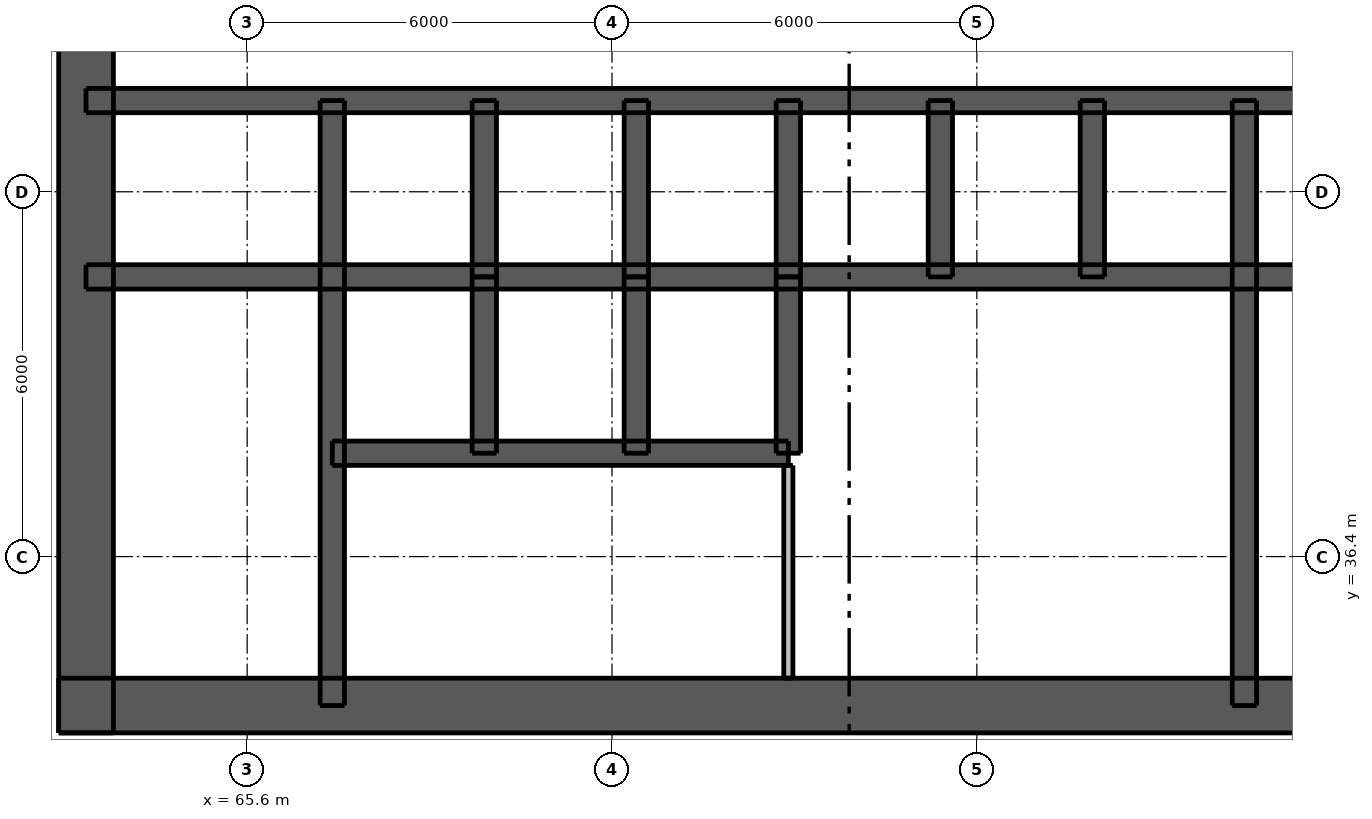
"""IFC4 building model, lengths in metres.
Left out: names, types, materials, properties, quantities, classifications, styles, units other than length and angle.
Written with IfcOpenShell. Run it as: python <this file> out.ifc"""

import sys

from ifc_helpers import new_model, si_unit, direction, frame, frame_2d, origin, place, context, subcontext, project, spatial, rectangle, extrude, element, fill, save


model = new_model("IFC4")
c1 = context("Model", 3, precision=1e-05, world=origin(), true_north=direction((0.0, 1.0)))
c2 = subcontext(c1, "Body", "Model", "MODEL_VIEW")
j1 = project(units=[si_unit("LENGTHUNIT", "METRE"), si_unit("PLANEANGLEUNIT", "RADIAN")], contexts=[c1])
p1 = place(None, origin())
s1 = spatial("IfcSite", under=j1, at=p1, CompositionType="ELEMENT")
p2 = place(p1, origin())
s2 = spatial("IfcBuilding", under=s1, at=p2, CompositionType="ELEMENT")
p3 = place(p2, frame((0.0, 0.0, 30.1)))
s3 = spatial("IfcBuildingStorey", under=s2, at=p3, CompositionType="ELEMENT", Elevation=30.1)
p4 = place(p3, frame((62.5, 33.95, 0.0), z_axis=(0.0, 0.0, 1.0), x_axis=(1.0, 0.0, 0.0)))
e1 = element("IfcWall", 1, at=p4, inside=s3, PredefinedType="SHEAR", context=c2, shape_type="SweptSolid", body=[
    extrude(rectangle(XDim=24.0, YDim=0.9, at=frame_2d((12.0, 0.0))), origin(), (0.0, 0.0, 1.0), 3.05),
])
p5 = place(p4, frame((2.05, 0.0, 0.0)))
e2 = element("IfcOpeningElement", 2, at=p5, cuts=e1, PredefinedType="OPENING", context=c2, shape_type="SweptSolid", body=[
    extrude(rectangle(XDim=1.1, YDim=2.1, at=frame_2d((0.55, 1.05))), frame((0.0, 0.46, 0.0), z_axis=(0.0, -1.0, 0.0), x_axis=(1.0, 0.0, 0.0)), (0.0, 0.0, 1.0), 0.92),
])
p6 = place(p4, frame((20.85, 0.0, 0.0)))
e3 = element("IfcOpeningElement", 3, at=p6, cuts=e1, PredefinedType="OPENING", context=c2, shape_type="SweptSolid", body=[
    extrude(rectangle(XDim=1.1, YDim=2.1, at=frame_2d((0.55, 1.05))), frame((0.0, 0.46, 0.0), z_axis=(0.0, -1.0, 0.0), x_axis=(1.0, 0.0, 0.0)), (0.0, 0.0, 1.0), 0.92),
])
p7 = place(p4, frame((8.0, 0.0, 0.0)))
e4 = element("IfcOpeningElement", 4, at=p7, cuts=e1, PredefinedType="OPENING", context=c2, shape_type="SweptSolid", body=[
    extrude(rectangle(XDim=1.1, YDim=2.1, at=frame_2d((0.55, 1.05))), frame((0.0, 0.46, 0.0), z_axis=(0.0, -1.0, 0.0), x_axis=(1.0, 0.0, 0.0)), (0.0, 0.0, 1.0), 0.92),
])
p8 = place(p4, frame((15.3, 0.0, 0.0)))
e5 = element("IfcOpeningElement", 5, at=p8, cuts=e1, PredefinedType="OPENING", context=c2, shape_type="SweptSolid", body=[
    extrude(rectangle(XDim=0.9, YDim=2.1, at=frame_2d((0.45, 1.05))), frame((0.0, 0.46, 0.0), z_axis=(0.0, -1.0, 0.0), x_axis=(1.0, 0.0, 0.0)), (0.0, 0.0, 1.0), 0.92),
])
p9 = place(p3, frame((62.95, 33.5, 0.0), z_axis=(0.0, 0.0, 1.0), x_axis=(0.0, 1.0, 0.0)))
e6 = element("IfcWall", 6, at=p9, inside=s3, PredefinedType="SHEAR", context=c2, shape_type="SweptSolid", body=[
    extrude(rectangle(XDim=24.0, YDim=0.9, at=frame_2d((12.0, 0.0))), origin(), (0.0, 0.0, 1.0), 3.05),
])
p10 = place(p9, frame((11.2, 0.0, 0.0)))
e7 = element("IfcOpeningElement", 7, at=p10, cuts=e6, PredefinedType="OPENING", context=c2, shape_type="SweptSolid", body=[
    extrude(rectangle(XDim=1.6, YDim=2.1, at=frame_2d((0.8, 1.05))), frame((0.0, 0.46, 0.0), z_axis=(0.0, -1.0, 0.0), x_axis=(1.0, 0.0, 0.0)), (0.0, 0.0, 1.0), 0.92),
])
p11 = place(p3, frame((62.95, 41.0, 0.0), z_axis=(0.0, 0.0, 1.0), x_axis=(1.0, 0.0, 0.0)))
e8 = element("IfcWall", 8, at=p11, inside=s3, PredefinedType="SHEAR", context=c2, shape_type="SweptSolid", body=[
    extrude(rectangle(XDim=23.1, YDim=0.4, at=frame_2d((11.55, 0.0))), origin(), (0.0, 0.0, 1.0), 3.05),
])
p12 = place(p3, frame((62.95, 43.9, 0.0), z_axis=(0.0, 0.0, 1.0), x_axis=(1.0, 0.0, 0.0)))
e9 = element("IfcWall", 9, at=p12, inside=s3, PredefinedType="SHEAR", context=c2, shape_type="SweptSolid", body=[
    extrude(rectangle(XDim=23.1, YDim=0.4, at=frame_2d((11.55, 0.0))), origin(), (0.0, 0.0, 1.0), 3.05),
])
p13 = place(p12, frame((1.7, 0.0, 0.0)))
e10 = element("IfcOpeningElement", 10, at=p13, cuts=e9, PredefinedType="OPENING", context=c2, shape_type="SweptSolid", body=[
    extrude(rectangle(XDim=0.9, YDim=2.1, at=frame_2d((0.45, 1.05))), frame((0.0, 0.21, 0.0), z_axis=(0.0, -1.0, 0.0), x_axis=(1.0, 0.0, 0.0)), (0.0, 0.0, 1.0), 0.42),
])
p14 = place(p12, frame((20.5, 0.0, 0.0)))
e11 = element("IfcOpeningElement", 11, at=p14, cuts=e9, PredefinedType="OPENING", context=c2, shape_type="SweptSolid", body=[
    extrude(rectangle(XDim=0.9, YDim=2.1, at=frame_2d((0.45, 1.05))), frame((0.0, 0.21, 0.0), z_axis=(0.0, -1.0, 0.0), x_axis=(1.0, 0.0, 0.0)), (0.0, 0.0, 1.0), 0.42),
])
p15 = place(p12, frame((4.75, 0.0, 0.0)))
e12 = element("IfcOpeningElement", 12, at=p15, cuts=e9, PredefinedType="OPENING", context=c2, shape_type="SweptSolid", body=[
    extrude(rectangle(XDim=1.1, YDim=2.1, at=frame_2d((0.55, 1.05))), frame((0.0, 0.21, 0.0), z_axis=(0.0, -1.0, 0.0), x_axis=(1.0, 0.0, 0.0)), (0.0, 0.0, 1.0), 0.42),
])
p16 = place(p12, frame((7.25, 0.0, 0.0)))
e13 = element("IfcOpeningElement", 13, at=p16, cuts=e9, PredefinedType="OPENING", context=c2, shape_type="SweptSolid", body=[
    extrude(rectangle(XDim=1.1, YDim=2.1, at=frame_2d((0.55, 1.05))), frame((0.0, 0.21, 0.0), z_axis=(0.0, -1.0, 0.0), x_axis=(1.0, 0.0, 0.0)), (0.0, 0.0, 1.0), 0.42),
])
p17 = place(p12, frame((9.75, 0.0, 0.0)))
e14 = element("IfcOpeningElement", 14, at=p17, cuts=e9, PredefinedType="OPENING", context=c2, shape_type="SweptSolid", body=[
    extrude(rectangle(XDim=1.1, YDim=2.1, at=frame_2d((0.55, 1.05))), frame((0.0, 0.21, 0.0), z_axis=(0.0, -1.0, 0.0), x_axis=(1.0, 0.0, 0.0)), (0.0, 0.0, 1.0), 0.42),
])
p18 = place(p12, frame((12.25, 0.0, 0.0)))
e15 = element("IfcOpeningElement", 15, at=p18, cuts=e9, PredefinedType="OPENING", context=c2, shape_type="SweptSolid", body=[
    extrude(rectangle(XDim=1.1, YDim=2.1, at=frame_2d((0.55, 1.05))), frame((0.0, 0.21, 0.0), z_axis=(0.0, -1.0, 0.0), x_axis=(1.0, 0.0, 0.0)), (0.0, 0.0, 1.0), 0.42),
])
p19 = place(p12, frame((14.75, 0.0, 0.0)))
e16 = element("IfcOpeningElement", 16, at=p19, cuts=e9, PredefinedType="OPENING", context=c2, shape_type="SweptSolid", body=[
    extrude(rectangle(XDim=1.1, YDim=2.1, at=frame_2d((0.55, 1.05))), frame((0.0, 0.21, 0.0), z_axis=(0.0, -1.0, 0.0), x_axis=(1.0, 0.0, 0.0)), (0.0, 0.0, 1.0), 0.42),
])
p20 = place(p12, frame((17.25, 0.0, 0.0)))
e17 = element("IfcOpeningElement", 17, at=p20, cuts=e9, PredefinedType="OPENING", context=c2, shape_type="SweptSolid", body=[
    extrude(rectangle(XDim=1.1, YDim=2.1, at=frame_2d((0.55, 1.05))), frame((0.0, 0.21, 0.0), z_axis=(0.0, -1.0, 0.0), x_axis=(1.0, 0.0, 0.0)), (0.0, 0.0, 1.0), 0.42),
])
p21 = place(p3, frame((67.0, 33.95, 0.0), z_axis=(0.0, 0.0, 1.0), x_axis=(0.0, 1.0, 0.0)))
e18 = element("IfcWall", 18, at=p21, inside=s3, PredefinedType="SHEAR", context=c2, shape_type="SweptSolid", body=[
    extrude(rectangle(XDim=9.95, YDim=0.4, at=frame_2d((4.975, 0.0))), origin(), (0.0, 0.0, 1.0), 3.05),
])
p22 = place(p21, frame((0.65, 0.0, 0.0)))
e19 = element("IfcOpeningElement", 19, at=p22, cuts=e18, PredefinedType="OPENING", context=c2, shape_type="SweptSolid", body=[
    extrude(rectangle(XDim=1.1, YDim=2.1, at=frame_2d((0.55, 1.05))), frame((0.0, 0.21, 0.0), z_axis=(0.0, -1.0, 0.0), x_axis=(1.0, 0.0, 0.0)), (0.0, 0.0, 1.0), 0.42),
])
p23 = place(p3, frame((82.0, 33.95, 0.0), z_axis=(0.0, 0.0, 1.0), x_axis=(0.0, 1.0, 0.0)))
e20 = element("IfcWall", 20, at=p23, inside=s3, PredefinedType="SHEAR", context=c2, shape_type="SweptSolid", body=[
    extrude(rectangle(XDim=9.95, YDim=0.4, at=frame_2d((4.975, 0.0))), origin(), (0.0, 0.0, 1.0), 3.05),
])
for number, where, z_axis, x_axis in (
    (21, (69.5, 41.0, 0.0), (0.0, 0.0, 1.0), (0.0, 1.0, 0.0)),
    (22, (72.0, 41.0, 0.0), (0.0, 0.0, 1.0), (0.0, 1.0, 0.0)),
    (23, (74.5, 41.0, 0.0), (0.0, 0.0, 1.0), (0.0, 1.0, 0.0)),
    (24, (77.0, 41.0, 0.0), (0.0, 0.0, 1.0), (0.0, 1.0, 0.0)),
    (25, (79.5, 41.0, 0.0), (0.0, 0.0, 1.0), (0.0, 1.0, 0.0)),
):
    element("IfcWall", number, at=place(p3, frame(where, z_axis=z_axis, x_axis=x_axis)), inside=s3, PredefinedType="SHEAR", context=c2, shape_type="SweptSolid", body=[
        extrude(rectangle(XDim=2.9, YDim=0.4, at=frame_2d((1.45, 0.0))), origin(), (0.0, 0.0, 1.0), 3.05),
    ])
p24 = place(p3, frame((67.0, 38.1, 0.0), z_axis=(0.0, 0.0, 1.0), x_axis=(1.0, 0.0, 0.0)))
e26 = element("IfcWall", 26, at=p24, inside=s3, PredefinedType="SHEAR", context=c2, shape_type="SweptSolid", body=[
    extrude(rectangle(XDim=7.5, YDim=0.4, at=frame_2d((3.75, 0.0))), origin(), (0.0, 0.0, 1.0), 3.05),
])
p25 = place(p24, frame((0.7, 0.0, 0.0)))
e27 = element("IfcOpeningElement", 27, at=p25, cuts=e26, PredefinedType="OPENING", context=c2, shape_type="SweptSolid", body=[
    extrude(rectangle(XDim=1.1, YDim=2.1, at=frame_2d((0.55, 1.05))), frame((0.0, 0.21, 0.0), z_axis=(0.0, -1.0, 0.0), x_axis=(1.0, 0.0, 0.0)), (0.0, 0.0, 1.0), 0.42),
])
p26 = place(p24, frame((3.2, 0.0, 0.0)))
e28 = element("IfcOpeningElement", 28, at=p26, cuts=e26, PredefinedType="OPENING", context=c2, shape_type="SweptSolid", body=[
    extrude(rectangle(XDim=1.1, YDim=2.1, at=frame_2d((0.55, 1.05))), frame((0.0, 0.21, 0.0), z_axis=(0.0, -1.0, 0.0), x_axis=(1.0, 0.0, 0.0)), (0.0, 0.0, 1.0), 0.42),
])
p27 = place(p24, frame((5.65, 0.0, 0.0)))
e29 = element("IfcOpeningElement", 29, at=p27, cuts=e26, PredefinedType="OPENING", context=c2, shape_type="SweptSolid", body=[
    extrude(rectangle(XDim=1.2, YDim=2.1, at=frame_2d((0.6, 1.05))), frame((0.0, 0.21, 0.0), z_axis=(0.0, -1.0, 0.0), x_axis=(1.0, 0.0, 0.0)), (0.0, 0.0, 1.0), 0.42),
])
for number, where, z_axis, x_axis in (
    (30, (69.5, 38.1, 0.0), (0.0, 0.0, 1.0), (0.0, 1.0, 0.0)),
    (31, (72.0, 38.1, 0.0), (0.0, 0.0, 1.0), (0.0, 1.0, 0.0)),
    (32, (74.5, 38.1, 0.0), (0.0, 0.0, 1.0), (0.0, 1.0, 0.0)),
):
    element("IfcWall", number, at=place(p3, frame(where, z_axis=z_axis, x_axis=x_axis)), inside=s3, PredefinedType="SHEAR", context=c2, shape_type="SweptSolid", body=[
        extrude(rectangle(XDim=2.9, YDim=0.4, at=frame_2d((1.45, 0.0))), origin(), (0.0, 0.0, 1.0), 3.05),
    ])
p28 = place(p3, frame((74.5, 34.4, 0.0), z_axis=(0.0, 0.0, 1.0), x_axis=(0.0, 1.0, 0.0)))
e33 = element("IfcWall", 33, at=p28, inside=s3, PredefinedType="PLUMBINGWALL", context=c2, shape_type="SweptSolid", body=[
    extrude(rectangle(XDim=3.5, YDim=0.15, at=frame_2d((1.75, 0.0))), origin(), (0.0, 0.0, 1.0), 3.05),
])
p29 = place(p5, origin())
e34 = element("IfcDoor", 34, at=p29, inside=s3, OperationType="SINGLE_SWING_LEFT", PredefinedType="DOOR", context=c2, shape_type="SweptSolid", body=[
    extrude(rectangle(XDim=1.1, YDim=2.1, at=frame_2d((0.55, 1.05))), frame((0.0, 0.438, 0.0), z_axis=(0.0, -1.0, 0.0), x_axis=(1.0, 0.0, 0.0)), (0.0, 0.0, 1.0), 0.05),
])
fill(e2, e34)
p30 = place(p7, origin())
e35 = element("IfcDoor", 35, at=p30, inside=s3, OperationType="SINGLE_SWING_LEFT", PredefinedType="DOOR", context=c2, shape_type="SweptSolid", body=[
    extrude(rectangle(XDim=1.1, YDim=2.1, at=frame_2d((0.55, 1.05))), frame((0.0, 0.438, 0.0), z_axis=(0.0, -1.0, 0.0), x_axis=(1.0, 0.0, 0.0)), (0.0, 0.0, 1.0), 0.05),
])
fill(e4, e35)
p31 = place(p22, origin())
e36 = element("IfcDoor", 36, at=p31, inside=s3, OperationType="SINGLE_SWING_RIGHT", PredefinedType="DOOR", context=c2, shape_type="SweptSolid", body=[
    extrude(rectangle(XDim=1.1, YDim=2.1, at=frame_2d((0.55, 1.05))), frame((0.0, -0.138, 0.0), z_axis=(0.0, -1.0, 0.0), x_axis=(1.0, 0.0, 0.0)), (0.0, 0.0, 1.0), 0.05),
])
fill(e19, e36)
p32 = place(p8, origin())
e37 = element("IfcDoor", 37, at=p32, inside=s3, OperationType="SINGLE_SWING_LEFT", PredefinedType="DOOR", context=c2, shape_type="SweptSolid", body=[
    extrude(rectangle(XDim=0.9, YDim=2.1, at=frame_2d((0.45, 1.05))), frame((0.0, 0.438, 0.0), z_axis=(0.0, -1.0, 0.0), x_axis=(1.0, 0.0, 0.0)), (0.0, 0.0, 1.0), 0.05),
])
fill(e5, e37)
p33 = place(p13, origin())
e38 = element("IfcDoor", 38, at=p33, inside=s3, OperationType="SINGLE_SWING_LEFT", PredefinedType="DOOR", context=c2, shape_type="SweptSolid", body=[
    extrude(rectangle(XDim=0.9, YDim=2.1, at=frame_2d((0.45, 1.05))), frame((0.0, -0.138, 0.0), z_axis=(0.0, -1.0, 0.0), x_axis=(1.0, 0.0, 0.0)), (0.0, 0.0, 1.0), 0.05),
])
fill(e10, e38)
p34 = place(p15, origin())
e39 = element("IfcDoor", 39, at=p34, inside=s3, OperationType="DOUBLE_DOOR_SLIDING", PredefinedType="DOOR", context=c2, shape_type="SweptSolid", body=[
    extrude(rectangle(XDim=1.1, YDim=2.1, at=frame_2d((0.55, 1.05))), frame((0.0, 0.025, 0.0), z_axis=(0.0, -1.0, 0.0), x_axis=(1.0, 0.0, 0.0)), (0.0, 0.0, 1.0), 0.05),
])
fill(e12, e39)
p35 = place(p16, origin())
e40 = element("IfcDoor", 40, at=p35, inside=s3, OperationType="DOUBLE_DOOR_SLIDING", PredefinedType="DOOR", context=c2, shape_type="SweptSolid", body=[
    extrude(rectangle(XDim=1.1, YDim=2.1, at=frame_2d((0.55, 1.05))), frame((0.0, 0.025, 0.0), z_axis=(0.0, -1.0, 0.0), x_axis=(1.0, 0.0, 0.0)), (0.0, 0.0, 1.0), 0.05),
])
fill(e13, e40)
p36 = place(p17, origin())
e41 = element("IfcDoor", 41, at=p36, inside=s3, OperationType="DOUBLE_DOOR_SLIDING", PredefinedType="DOOR", context=c2, shape_type="SweptSolid", body=[
    extrude(rectangle(XDim=1.1, YDim=2.1, at=frame_2d((0.55, 1.05))), frame((0.0, 0.025, 0.0), z_axis=(0.0, -1.0, 0.0), x_axis=(1.0, 0.0, 0.0)), (0.0, 0.0, 1.0), 0.05),
])
fill(e14, e41)
p37 = place(p18, origin())
e42 = element("IfcDoor", 42, at=p37, inside=s3, OperationType="DOUBLE_DOOR_SLIDING", PredefinedType="DOOR", context=c2, shape_type="SweptSolid", body=[
    extrude(rectangle(XDim=1.1, YDim=2.1, at=frame_2d((0.55, 1.05))), frame((0.0, 0.025, 0.0), z_axis=(0.0, -1.0, 0.0), x_axis=(1.0, 0.0, 0.0)), (0.0, 0.0, 1.0), 0.05),
])
fill(e15, e42)
p38 = place(p19, origin())
e43 = element("IfcDoor", 43, at=p38, inside=s3, OperationType="DOUBLE_DOOR_SLIDING", PredefinedType="DOOR", context=c2, shape_type="SweptSolid", body=[
    extrude(rectangle(XDim=1.1, YDim=2.1, at=frame_2d((0.55, 1.05))), frame((0.0, 0.025, 0.0), z_axis=(0.0, -1.0, 0.0), x_axis=(1.0, 0.0, 0.0)), (0.0, 0.0, 1.0), 0.05),
])
fill(e16, e43)
p39 = place(p20, origin())
e44 = element("IfcDoor", 44, at=p39, inside=s3, OperationType="DOUBLE_DOOR_SLIDING", PredefinedType="DOOR", context=c2, shape_type="SweptSolid", body=[
    extrude(rectangle(XDim=1.1, YDim=2.1, at=frame_2d((0.55, 1.05))), frame((0.0, 0.025, 0.0), z_axis=(0.0, -1.0, 0.0), x_axis=(1.0, 0.0, 0.0)), (0.0, 0.0, 1.0), 0.05),
])
fill(e17, e44)
p40 = place(p25, origin())
e45 = element("IfcDoor", 45, at=p40, inside=s3, OperationType="DOUBLE_DOOR_SLIDING", PredefinedType="DOOR", context=c2, shape_type="SweptSolid", body=[
    extrude(rectangle(XDim=1.1, YDim=2.1, at=frame_2d((0.55, 1.05))), frame((0.0, 0.025, 0.0), z_axis=(0.0, -1.0, 0.0), x_axis=(1.0, 0.0, 0.0)), (0.0, 0.0, 1.0), 0.05),
])
fill(e27, e45)
p41 = place(p26, origin())
e46 = element("IfcDoor", 46, at=p41, inside=s3, OperationType="DOUBLE_DOOR_SLIDING", PredefinedType="DOOR", context=c2, shape_type="SweptSolid", body=[
    extrude(rectangle(XDim=1.1, YDim=2.1, at=frame_2d((0.55, 1.05))), frame((0.0, 0.025, 0.0), z_axis=(0.0, -1.0, 0.0), x_axis=(1.0, 0.0, 0.0)), (0.0, 0.0, 1.0), 0.05),
])
fill(e28, e46)
p42 = place(p27, origin())
e47 = element("IfcDoor", 47, at=p42, inside=s3, OperationType="DOUBLE_DOOR_SLIDING", PredefinedType="DOOR", context=c2, shape_type="SweptSolid", body=[
    extrude(rectangle(XDim=1.2, YDim=2.1, at=frame_2d((0.6, 1.05))), frame((0.0, 0.025, 0.0), z_axis=(0.0, -1.0, 0.0), x_axis=(1.0, 0.0, 0.0)), (0.0, 0.0, 1.0), 0.05),
])
fill(e29, e47)
save(model, sys.argv[1])
